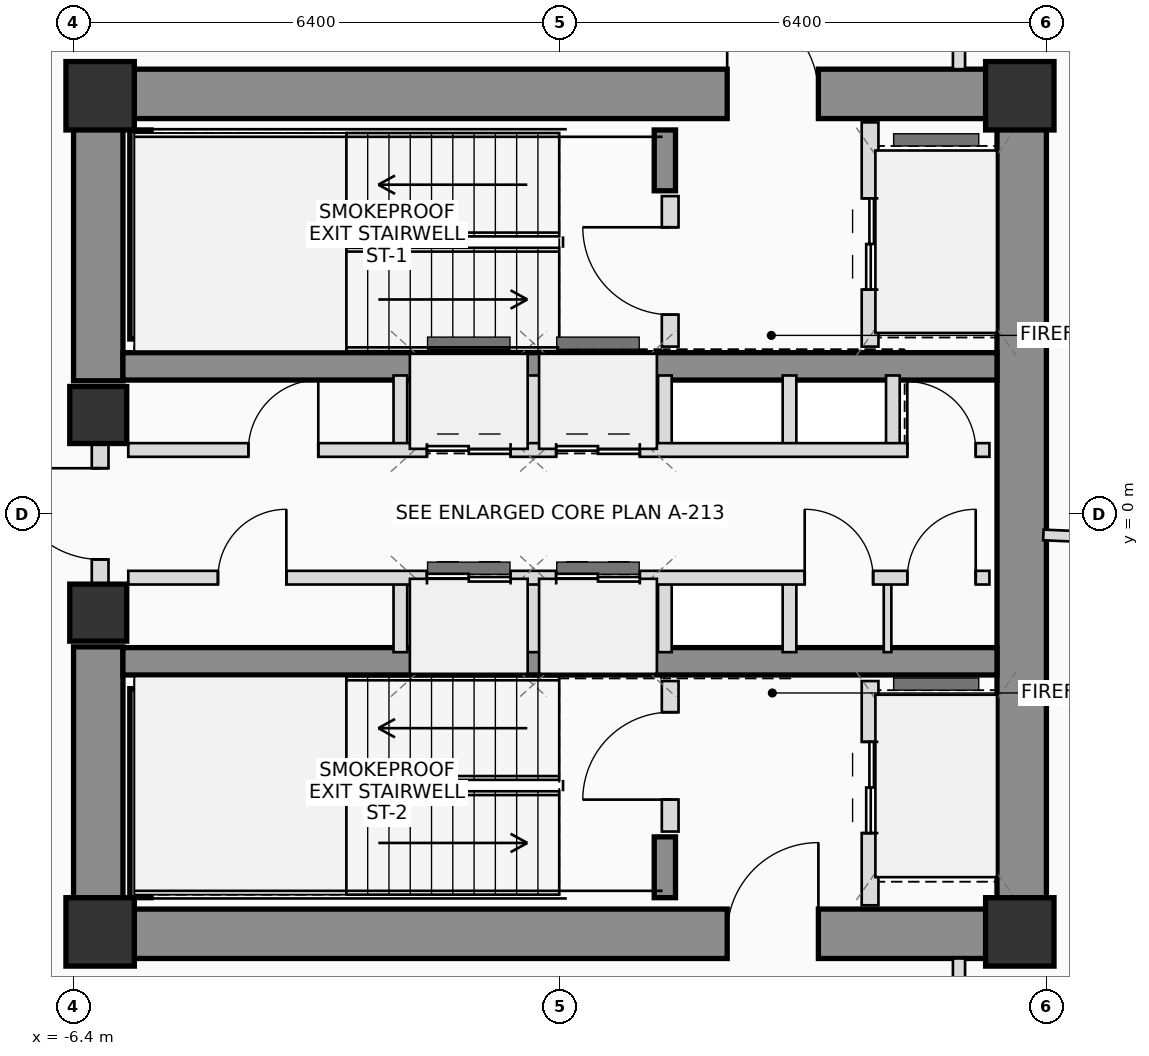
"""IFC4 building model, lengths in metres.
Left out: names, types, materials, properties, quantities, classifications, styles, units other than length and angle.
Written with IfcOpenShell. Run it as: python <this file> out.ifc"""

import sys

from ifc_helpers import new_model, si_unit, direction, frame, frame_2d, origin, origin_2d, place, context, subcontext, project, spatial, rectangle, extrude, source, transform, mapped, element, fill, save


model = new_model("IFC4")
c1 = context("Model", 3, precision=1e-05, world=origin(), true_north=direction((0.0, 1.0)))
c2 = subcontext(c1, "Body", "Model", "MODEL_VIEW")
j1 = project(units=[si_unit("LENGTHUNIT", "METRE"), si_unit("PLANEANGLEUNIT", "RADIAN")], contexts=[c1])
p1 = place(None, origin())
s1 = spatial("IfcSite", under=j1, at=p1, CompositionType="ELEMENT")
p2 = place(p1, origin())
s2 = spatial("IfcBuilding", under=s1, at=p2, CompositionType="ELEMENT")
p3 = place(p2, frame((0.0, 0.0, 136.4)))
s3 = spatial("IfcBuildingStorey", under=s2, at=p3, CompositionType="ELEMENT", Elevation=136.4)
m1 = source(origin(), c2, "Body", "SweptSolid", [
    extrude(rectangle(XDim=0.9, YDim=0.9, at=origin_2d()), origin(), (0.0, 0.0, 1.0), 3.45),
])
for number, where, z_axis, x_axis in (
    (1, (-6.05, -5.5, 0.0), (0.0, 0.0, 1.0), (1.0, 0.0, 0.0)),
    (2, (6.05, -5.5, 0.0), (0.0, 0.0, 1.0), (1.0, 0.0, 0.0)),
    (3, (6.05, 5.5, 0.0), (0.0, 0.0, 1.0), (1.0, 0.0, 0.0)),
    (4, (-6.05, 5.5, 0.0), (0.0, 0.0, 1.0), (1.0, 0.0, 0.0)),
):
    element("IfcColumn", number, at=place(p3, frame(where, z_axis=z_axis, x_axis=x_axis)), inside=s3, PredefinedType="COLUMN", context=c2, shape_type="MappedRepresentation", body=[
        mapped(m1, transform((0.0, 0.0, 0.0), scale=1.0)),
    ])
p4 = place(p3, frame((-6.4, 5.525, 0.0), z_axis=(0.0, 0.0, 1.0), x_axis=(1.0, 0.0, 0.0)))
e5 = element("IfcWall", 5, at=p4, inside=s3, PredefinedType="SHEAR", context=c2, shape_type="SweptSolid", body=[
    extrude(rectangle(XDim=12.8, YDim=0.65, at=frame_2d((6.4, 0.0))), origin(), (0.0, 0.0, 1.0), 3.45),
])
p5 = place(p4, frame((8.6, 0.0, 0.0)))
e6 = element("IfcOpeningElement", 6, at=p5, cuts=e5, PredefinedType="OPENING", context=c2, shape_type="SweptSolid", body=[
    extrude(rectangle(XDim=1.2, YDim=2.2, at=frame_2d((0.6, 1.1))), frame((0.0, 0.335, 0.0), z_axis=(0.0, -1.0, 0.0), x_axis=(1.0, 0.0, 0.0)), (0.0, 0.0, 1.0), 0.67),
])
p6 = place(p3, frame((-6.4, -5.525, 0.0), z_axis=(0.0, 0.0, 1.0), x_axis=(1.0, 0.0, 0.0)))
e7 = element("IfcWall", 7, at=p6, inside=s3, PredefinedType="SHEAR", context=c2, shape_type="SweptSolid", body=[
    extrude(rectangle(XDim=12.8, YDim=0.65, at=frame_2d((6.4, 0.0))), origin(), (0.0, 0.0, 1.0), 3.45),
])
p7 = place(p6, frame((8.6, 0.0, 0.0)))
e8 = element("IfcOpeningElement", 8, at=p7, cuts=e7, PredefinedType="OPENING", context=c2, shape_type="SweptSolid", body=[
    extrude(rectangle(XDim=1.2, YDim=2.2, at=frame_2d((0.6, 1.1))), frame((0.0, 0.335, 0.0), z_axis=(0.0, -1.0, 0.0), x_axis=(1.0, 0.0, 0.0)), (0.0, 0.0, 1.0), 0.67),
])
p8 = place(p3, frame((6.075, -5.2, 0.0), z_axis=(0.0, 0.0, 1.0), x_axis=(0.0, 1.0, 0.0)))
e9 = element("IfcWall", 9, at=p8, inside=s3, PredefinedType="SHEAR", context=c2, shape_type="SweptSolid", body=[
    extrude(rectangle(XDim=10.4, YDim=0.65, at=frame_2d((5.2, 0.0))), origin(), (0.0, 0.0, 1.0), 3.45),
])
for number, where, z_axis, x_axis in (
    (10, (-6.075, -5.2, 0.0), (0.0, 0.0, 1.0), (0.0, 1.0, 0.0)),
    (11, (-6.075, 1.75, 0.0), (0.0, 0.0, 1.0), (0.0, 1.0, 0.0)),
):
    element("IfcWall", number, at=place(p3, frame(where, z_axis=z_axis, x_axis=x_axis)), inside=s3, PredefinedType="SHEAR", context=c2, shape_type="SweptSolid", body=[
        extrude(rectangle(XDim=3.45, YDim=0.65, at=frame_2d((1.725, 0.0))), origin(), (0.0, 0.0, 1.0), 3.45),
    ])
for number, where, z_axis, x_axis in (
    (12, (-5.75, 1.94, 0.0), (0.0, 0.0, 1.0), (1.0, 0.0, 0.0)),
    (13, (-5.75, -1.94, 0.0), (0.0, 0.0, 1.0), (1.0, 0.0, 0.0)),
):
    element("IfcWall", number, at=place(p3, frame(where, z_axis=z_axis, x_axis=x_axis)), inside=s3, PredefinedType="SHEAR", context=c2, shape_type="SweptSolid", body=[
        extrude(rectangle(XDim=11.5, YDim=0.36, at=frame_2d((5.75, 0.0))), origin(), (0.0, 0.0, 1.0), 3.45),
    ])
p9 = place(p3, frame((-5.52, 2.3, 0.0), z_axis=(0.0, 0.0, 1.0), x_axis=(0.0, 1.0, 0.0)))
e14 = element("IfcWall", 14, at=p9, inside=s3, PredefinedType="SHEAR", context=c2, shape_type="SweptSolid", body=[
    extrude(rectangle(XDim=2.75, YDim=0.28, at=frame_2d((1.375, 0.0))), origin(), (0.0, 0.0, 1.0), 3.45),
])
p10 = place(p3, frame((1.38, 4.25, 0.0), z_axis=(0.0, 0.0, 1.0), x_axis=(0.0, 1.0, 0.0)))
e15 = element("IfcWall", 15, at=p10, inside=s3, PredefinedType="SHEAR", context=c2, shape_type="SweptSolid", body=[
    extrude(rectangle(XDim=0.8, YDim=0.28, at=frame_2d((0.4, 0.0))), origin(), (0.0, 0.0, 1.0), 3.45),
])
p11 = place(p3, frame((-5.52, -5.05, 0.0), z_axis=(0.0, 0.0, 1.0), x_axis=(0.0, 1.0, 0.0)))
e16 = element("IfcWall", 16, at=p11, inside=s3, PredefinedType="SHEAR", context=c2, shape_type="SweptSolid", body=[
    extrude(rectangle(XDim=2.75, YDim=0.28, at=frame_2d((1.375, 0.0))), origin(), (0.0, 0.0, 1.0), 3.45),
])
p12 = place(p3, frame((1.38, -5.05, 0.0), z_axis=(0.0, 0.0, 1.0), x_axis=(0.0, 1.0, 0.0)))
e17 = element("IfcWall", 17, at=p12, inside=s3, PredefinedType="SHEAR", context=c2, shape_type="SweptSolid", body=[
    extrude(rectangle(XDim=0.8, YDim=0.28, at=frame_2d((0.4, 0.0))), origin(), (0.0, 0.0, 1.0), 3.45),
])
m2 = source(origin(), c2, "Body", "SweptSolid", [
    extrude(rectangle(XDim=0.75, YDim=0.75, at=origin_2d()), origin(), (0.0, 0.0, 1.0), 3.45),
])
for number, where, z_axis, x_axis in (
    (18, (-6.075, -1.3, 0.0), (0.0, 0.0, 1.0), (1.0, 0.0, 0.0)),
    (19, (-6.075, 1.3, 0.0), (0.0, 0.0, 1.0), (1.0, 0.0, 0.0)),
):
    element("IfcColumn", number, at=place(p3, frame(where, z_axis=z_axis, x_axis=x_axis)), inside=s3, PredefinedType="COLUMN", context=c2, shape_type="MappedRepresentation", body=[
        mapped(m2, transform((0.0, 0.0, 0.0), scale=1.0)),
    ])
p13 = place(p3, frame((-6.05, -0.95, 0.0), z_axis=(0.0, 0.0, 1.0), x_axis=(0.0, 1.0, 0.0)))
e20 = element("IfcWall", 20, at=p13, inside=s3, PredefinedType="PLUMBINGWALL", context=c2, shape_type="SweptSolid", body=[
    extrude(rectangle(XDim=1.9, YDim=0.22, at=frame_2d((0.95, 0.0))), origin(), (0.0, 0.0, 1.0), 2.23),
])
p14 = place(p13, frame((0.35, 0.0, 0.0)))
e21 = element("IfcOpeningElement", 21, at=p14, cuts=e20, PredefinedType="OPENING", context=c2, shape_type="SweptSolid", body=[
    extrude(rectangle(XDim=1.2, YDim=2.2, at=frame_2d((0.6, 1.1))), frame((0.0, 0.12, 0.0), z_axis=(0.0, -1.0, 0.0), x_axis=(1.0, 0.0, 0.0)), (0.0, 0.0, 1.0), 0.24),
])
p15 = place(p3, frame((1.45, 2.2, 0.0), z_axis=(0.0, 0.0, 1.0), x_axis=(0.0, 1.0, 0.0)))
e22 = element("IfcWall", 22, at=p15, inside=s3, PredefinedType="PLUMBINGWALL", context=c2, shape_type="SweptSolid", body=[
    extrude(rectangle(XDim=1.98, YDim=0.22, at=frame_2d((0.99, 0.0))), origin(), (0.0, 0.0, 1.0), 3.25),
])
p16 = place(p15, frame((0.42, 0.0, 0.0)))
e23 = element("IfcOpeningElement", 23, at=p16, cuts=e22, PredefinedType="OPENING", context=c2, shape_type="SweptSolid", body=[
    extrude(rectangle(XDim=1.15, YDim=2.15, at=frame_2d((0.575, 1.075))), frame((0.0, 0.12, 0.0), z_axis=(0.0, -1.0, 0.0), x_axis=(1.0, 0.0, 0.0)), (0.0, 0.0, 1.0), 0.24),
])
p17 = place(p3, frame((4.08, 2.2, 0.0), z_axis=(0.0, 0.0, 1.0), x_axis=(0.0, 1.0, 0.0)))
e24 = element("IfcWall", 24, at=p17, inside=s3, PredefinedType="PLUMBINGWALL", context=c2, shape_type="SweptSolid", body=[
    extrude(rectangle(XDim=2.95, YDim=0.22, at=frame_2d((1.475, 0.0))), origin(), (0.0, 0.0, 1.0), 3.25),
])
p18 = place(p17, frame((0.75, 0.0, 0.0)))
e25 = element("IfcOpeningElement", 25, at=p18, cuts=e24, PredefinedType="OPENING", context=c2, shape_type="SweptSolid", body=[
    extrude(rectangle(XDim=1.2, YDim=2.25, at=frame_2d((0.6, 1.125))), frame((0.0, 0.12, 0.0), z_axis=(0.0, -1.0, 0.0), x_axis=(1.0, 0.0, 0.0)), (0.0, 0.0, 1.0), 0.24),
])
p19 = place(p3, frame((1.45, -4.18, 0.0), z_axis=(0.0, 0.0, 1.0), x_axis=(0.0, 1.0, 0.0)))
e26 = element("IfcWall", 26, at=p19, inside=s3, PredefinedType="PLUMBINGWALL", context=c2, shape_type="SweptSolid", body=[
    extrude(rectangle(XDim=1.98, YDim=0.22, at=frame_2d((0.99, 0.0))), origin(), (0.0, 0.0, 1.0), 3.25),
])
p20 = place(p19, frame((0.42, 0.0, 0.0)))
e27 = element("IfcOpeningElement", 27, at=p20, cuts=e26, PredefinedType="OPENING", context=c2, shape_type="SweptSolid", body=[
    extrude(rectangle(XDim=1.15, YDim=2.15, at=frame_2d((0.575, 1.075))), frame((0.0, 0.12, 0.0), z_axis=(0.0, -1.0, 0.0), x_axis=(1.0, 0.0, 0.0)), (0.0, 0.0, 1.0), 0.24),
])
p21 = place(p3, frame((4.08, -5.15, 0.0), z_axis=(0.0, 0.0, 1.0), x_axis=(0.0, 1.0, 0.0)))
e28 = element("IfcWall", 28, at=p21, inside=s3, PredefinedType="PLUMBINGWALL", context=c2, shape_type="SweptSolid", body=[
    extrude(rectangle(XDim=2.95, YDim=0.22, at=frame_2d((1.475, 0.0))), origin(), (0.0, 0.0, 1.0), 3.25),
])
p22 = place(p21, frame((0.95, 0.0, 0.0)))
e29 = element("IfcOpeningElement", 29, at=p22, cuts=e28, PredefinedType="OPENING", context=c2, shape_type="SweptSolid", body=[
    extrude(rectangle(XDim=1.2, YDim=2.25, at=frame_2d((0.6, 1.125))), frame((0.0, 0.12, 0.0), z_axis=(0.0, -1.0, 0.0), x_axis=(1.0, 0.0, 0.0)), (0.0, 0.0, 1.0), 0.24),
])
for number, where, z_axis, x_axis in (
    (30, (-2.1, 0.84, 0.0), (0.0, 0.0, 1.0), (0.0, 1.0, 0.0)),
    (31, (-2.1, -1.82, 0.0), (0.0, 0.0, 1.0), (0.0, 1.0, 0.0)),
    (32, (-0.35, 0.84, 0.0), (0.0, 0.0, 1.0), (0.0, 1.0, 0.0)),
    (33, (-0.35, -1.82, 0.0), (0.0, 0.0, 1.0), (0.0, 1.0, 0.0)),
    (34, (1.38, 0.84, 0.0), (0.0, 0.0, 1.0), (0.0, 1.0, 0.0)),
    (35, (1.38, -1.82, 0.0), (0.0, 0.0, 1.0), (0.0, 1.0, 0.0)),
    (36, (3.02, 0.84, 0.0), (0.0, 0.0, 1.0), (0.0, 1.0, 0.0)),
    (37, (4.38, 0.84, 0.0), (0.0, 0.0, 1.0), (0.0, 1.0, 0.0)),
    (38, (3.02, -1.82, 0.0), (0.0, 0.0, 1.0), (0.0, 1.0, 0.0)),
):
    element("IfcWall", number, at=place(p3, frame(where, z_axis=z_axis, x_axis=x_axis)), inside=s3, PredefinedType="PLUMBINGWALL", context=c2, shape_type="SweptSolid", body=[
        extrude(rectangle(XDim=0.98, YDim=0.18, at=frame_2d((0.49, 0.0))), origin(), (0.0, 0.0, 1.0), 3.25),
    ])
p23 = place(p3, frame((4.31, -1.82, 0.0), z_axis=(0.0, 0.0, 1.0), x_axis=(0.0, 1.0, 0.0)))
e39 = element("IfcWall", 39, at=p23, inside=s3, PredefinedType="PARTITIONING", context=c2, shape_type="SweptSolid", body=[
    extrude(rectangle(XDim=0.98, YDim=0.1, at=frame_2d((0.49, 0.0))), origin(), (0.0, 0.0, 1.0), 3.25),
])
p24 = place(p3, frame((-5.68, 0.84, 0.0), z_axis=(0.0, 0.0, 1.0), x_axis=(1.0, 0.0, 0.0)))
e40 = element("IfcWall", 40, at=p24, inside=s3, PredefinedType="PLUMBINGWALL", context=c2, shape_type="SweptSolid", body=[
    extrude(rectangle(XDim=11.33, YDim=0.18, at=frame_2d((5.665, 0.0))), origin(), (0.0, 0.0, 1.0), 3.25),
])
p25 = place(p24, frame((1.58, 0.0, 0.0)))
e41 = element("IfcOpeningElement", 41, at=p25, cuts=e40, PredefinedType="OPENING", context=c2, shape_type="SweptSolid", body=[
    extrude(rectangle(XDim=0.92, YDim=2.1, at=frame_2d((0.46, 1.05))), frame((0.0, 0.1, 0.0), z_axis=(0.0, -1.0, 0.0), x_axis=(1.0, 0.0, 0.0)), (0.0, 0.0, 1.0), 0.2),
])
p26 = place(p24, frame((3.93, 0.0, 0.0)))
e42 = element("IfcOpeningElement", 42, at=p26, cuts=e40, PredefinedType="OPENING", context=c2, shape_type="SweptSolid", body=[
    extrude(rectangle(XDim=1.1, YDim=2.2, at=frame_2d((0.55, 1.1))), frame((0.0, 0.1, 0.0), z_axis=(0.0, -1.0, 0.0), x_axis=(1.0, 0.0, 0.0)), (0.0, 0.0, 1.0), 0.2),
])
p27 = place(p24, frame((5.63, 0.0, 0.0)))
e43 = element("IfcOpeningElement", 43, at=p27, cuts=e40, PredefinedType="OPENING", context=c2, shape_type="SweptSolid", body=[
    extrude(rectangle(XDim=1.1, YDim=2.2, at=frame_2d((0.55, 1.1))), frame((0.0, 0.1, 0.0), z_axis=(0.0, -1.0, 0.0), x_axis=(1.0, 0.0, 0.0)), (0.0, 0.0, 1.0), 0.2),
])
p28 = place(p24, frame((10.25, 0.0, 0.0)))
e44 = element("IfcOpeningElement", 44, at=p28, cuts=e40, PredefinedType="OPENING", context=c2, shape_type="SweptSolid", body=[
    extrude(rectangle(XDim=0.9, YDim=2.05, at=frame_2d((0.45, 1.025))), frame((0.0, 0.1, 0.0), z_axis=(0.0, -1.0, 0.0), x_axis=(1.0, 0.0, 0.0)), (0.0, 0.0, 1.0), 0.2),
])
p29 = place(p3, frame((-5.68, -0.84, 0.0), z_axis=(0.0, 0.0, 1.0), x_axis=(1.0, 0.0, 0.0)))
e45 = element("IfcWall", 45, at=p29, inside=s3, PredefinedType="PLUMBINGWALL", context=c2, shape_type="SweptSolid", body=[
    extrude(rectangle(XDim=11.33, YDim=0.18, at=frame_2d((5.665, 0.0))), origin(), (0.0, 0.0, 1.0), 3.25),
])
p30 = place(p29, frame((1.18, 0.0, 0.0)))
e46 = element("IfcOpeningElement", 46, at=p30, cuts=e45, PredefinedType="OPENING", context=c2, shape_type="SweptSolid", body=[
    extrude(rectangle(XDim=0.9, YDim=2.05, at=frame_2d((0.45, 1.025))), frame((0.0, 0.1, 0.0), z_axis=(0.0, -1.0, 0.0), x_axis=(1.0, 0.0, 0.0)), (0.0, 0.0, 1.0), 0.2),
])
p31 = place(p29, frame((3.93, 0.0, 0.0)))
e47 = element("IfcOpeningElement", 47, at=p31, cuts=e45, PredefinedType="OPENING", context=c2, shape_type="SweptSolid", body=[
    extrude(rectangle(XDim=1.1, YDim=2.2, at=frame_2d((0.55, 1.1))), frame((0.0, 0.1, 0.0), z_axis=(0.0, -1.0, 0.0), x_axis=(1.0, 0.0, 0.0)), (0.0, 0.0, 1.0), 0.2),
])
p32 = place(p29, frame((5.63, 0.0, 0.0)))
e48 = element("IfcOpeningElement", 48, at=p32, cuts=e45, PredefinedType="OPENING", context=c2, shape_type="SweptSolid", body=[
    extrude(rectangle(XDim=1.1, YDim=2.2, at=frame_2d((0.55, 1.1))), frame((0.0, 0.1, 0.0), z_axis=(0.0, -1.0, 0.0), x_axis=(1.0, 0.0, 0.0)), (0.0, 0.0, 1.0), 0.2),
])
p33 = place(p29, frame((8.9, 0.0, 0.0)))
e49 = element("IfcOpeningElement", 49, at=p33, cuts=e45, PredefinedType="OPENING", context=c2, shape_type="SweptSolid", body=[
    extrude(rectangle(XDim=0.9, YDim=2.05, at=frame_2d((0.45, 1.025))), frame((0.0, 0.1, 0.0), z_axis=(0.0, -1.0, 0.0), x_axis=(1.0, 0.0, 0.0)), (0.0, 0.0, 1.0), 0.2),
])
p34 = place(p29, frame((10.25, 0.0, 0.0)))
e50 = element("IfcOpeningElement", 50, at=p34, cuts=e45, PredefinedType="OPENING", context=c2, shape_type="SweptSolid", body=[
    extrude(rectangle(XDim=0.9, YDim=2.05, at=frame_2d((0.45, 1.025))), frame((0.0, 0.1, 0.0), z_axis=(0.0, -1.0, 0.0), x_axis=(1.0, 0.0, 0.0)), (0.0, 0.0, 1.0), 0.2),
])
p35 = place(p3, frame((5.25, 7.55, 0.0), z_axis=(0.0, 0.0, 1.0), x_axis=(0.0, -1.0, 0.0)))
e51 = element("IfcWall", 51, at=p35, inside=s3, PredefinedType="PARTITIONING", context=c2, shape_type="SweptSolid", body=[
    extrude(rectangle(XDim=1.7, YDim=0.16, at=frame_2d((0.85, 0.0))), origin(), (0.0, 0.0, 1.0), 2.605),
])
p36 = place(p3, frame((5.25, -5.85, 0.0), z_axis=(0.0, 0.0, 1.0), x_axis=(0.0, -1.0, 0.0)))
e52 = element("IfcWall", 52, at=p36, inside=s3, PredefinedType="PARTITIONING", context=c2, shape_type="SweptSolid", body=[
    extrude(rectangle(XDim=1.7, YDim=0.16, at=frame_2d((0.85, 0.0))), origin(), (0.0, 0.0, 1.0), 3.25),
])
p37 = place(p3, frame((6.36, -0.278, 0.0), z_axis=(0.0, 0.0, 1.0), x_axis=(0.999047707238, -0.043631166178, 0.0)))
e53 = element("IfcWall", 53, at=p37, inside=s3, PredefinedType="PARTITIONING", context=c2, shape_type="SweptSolid", body=[
    extrude(rectangle(XDim=8.522, YDim=0.14, at=frame_2d((4.261, 0.0))), origin(), (0.0, 0.0, 1.0), 2.605),
])
p38 = place(p5, origin())
e54 = element("IfcDoor", 54, at=p38, inside=s3, OperationType="SINGLE_SWING_LEFT", PredefinedType="DOOR", context=c2, shape_type="SweptSolid", body=[
    extrude(rectangle(XDim=1.2, YDim=2.2, at=frame_2d((0.6, 1.1))), frame((0.0, 0.025, 0.0), z_axis=(0.0, -1.0, 0.0), x_axis=(1.0, 0.0, 0.0)), (0.0, 0.0, 1.0), 0.05),
])
fill(e6, e54)
p39 = place(p7, origin())
e55 = element("IfcDoor", 55, at=p39, inside=s3, OperationType="SINGLE_SWING_RIGHT", PredefinedType="DOOR", context=c2, shape_type="SweptSolid", body=[
    extrude(rectangle(XDim=1.2, YDim=2.2, at=frame_2d((0.6, 1.1))), frame((0.0, 0.025, 0.0), z_axis=(0.0, -1.0, 0.0), x_axis=(1.0, 0.0, 0.0)), (0.0, 0.0, 1.0), 0.05),
])
fill(e8, e55)
p40 = place(p14, origin())
e56 = element("IfcDoor", 56, at=p40, inside=s3, OperationType="SINGLE_SWING_RIGHT", PredefinedType="DOOR", context=c2, shape_type="SweptSolid", body=[
    extrude(rectangle(XDim=1.2, YDim=2.2, at=frame_2d((0.6, 1.1))), frame((0.0, 0.025, 0.0), z_axis=(0.0, -1.0, 0.0), x_axis=(1.0, 0.0, 0.0)), (0.0, 0.0, 1.0), 0.05),
])
fill(e21, e56)
p41 = place(p16, origin())
e57 = element("IfcDoor", 57, at=p41, inside=s3, OperationType="SINGLE_SWING_RIGHT", PredefinedType="DOOR", context=c2, shape_type="SweptSolid", body=[
    extrude(rectangle(XDim=1.15, YDim=2.15, at=frame_2d((0.575, 1.075))), frame((0.0, 0.025, 0.0), z_axis=(0.0, -1.0, 0.0), x_axis=(1.0, 0.0, 0.0)), (0.0, 0.0, 1.0), 0.05),
])
fill(e23, e57)
p42 = place(p18, origin())
e58 = element("IfcDoor", 58, at=p42, inside=s3, OperationType="DOUBLE_DOOR_SLIDING", PredefinedType="DOOR", context=c2, shape_type="SweptSolid", body=[
    extrude(rectangle(XDim=1.2, YDim=2.25, at=frame_2d((0.6, 1.125))), frame((0.0, 0.025, 0.0), z_axis=(0.0, -1.0, 0.0), x_axis=(1.0, 0.0, 0.0)), (0.0, 0.0, 1.0), 0.05),
])
fill(e25, e58)
p43 = place(p20, origin())
e59 = element("IfcDoor", 59, at=p43, inside=s3, OperationType="SINGLE_SWING_LEFT", PredefinedType="DOOR", context=c2, shape_type="SweptSolid", body=[
    extrude(rectangle(XDim=1.15, YDim=2.15, at=frame_2d((0.575, 1.075))), frame((0.0, 0.025, 0.0), z_axis=(0.0, -1.0, 0.0), x_axis=(1.0, 0.0, 0.0)), (0.0, 0.0, 1.0), 0.05),
])
fill(e27, e59)
p44 = place(p22, origin())
e60 = element("IfcDoor", 60, at=p44, inside=s3, OperationType="DOUBLE_DOOR_SLIDING", PredefinedType="DOOR", context=c2, shape_type="SweptSolid", body=[
    extrude(rectangle(XDim=1.2, YDim=2.25, at=frame_2d((0.6, 1.125))), frame((0.0, 0.025, 0.0), z_axis=(0.0, -1.0, 0.0), x_axis=(1.0, 0.0, 0.0)), (0.0, 0.0, 1.0), 0.05),
])
fill(e29, e60)
p45 = place(p25, origin())
e61 = element("IfcDoor", 61, at=p45, inside=s3, OperationType="SINGLE_SWING_RIGHT", PredefinedType="DOOR", context=c2, shape_type="SweptSolid", body=[
    extrude(rectangle(XDim=0.92, YDim=2.1, at=frame_2d((0.46, 1.05))), frame((0.0, 0.025, 0.0), z_axis=(0.0, -1.0, 0.0), x_axis=(1.0, 0.0, 0.0)), (0.0, 0.0, 1.0), 0.05),
])
fill(e41, e61)
p46 = place(p26, origin())
e62 = element("IfcDoor", 62, at=p46, inside=s3, OperationType="DOUBLE_DOOR_SLIDING", PredefinedType="DOOR", context=c2, shape_type="SweptSolid", body=[
    extrude(rectangle(XDim=1.1, YDim=2.2, at=frame_2d((0.55, 1.1))), frame((0.0, 0.025, 0.0), z_axis=(0.0, -1.0, 0.0), x_axis=(1.0, 0.0, 0.0)), (0.0, 0.0, 1.0), 0.05),
])
fill(e42, e62)
p47 = place(p27, origin())
e63 = element("IfcDoor", 63, at=p47, inside=s3, OperationType="DOUBLE_DOOR_SLIDING", PredefinedType="DOOR", context=c2, shape_type="SweptSolid", body=[
    extrude(rectangle(XDim=1.1, YDim=2.2, at=frame_2d((0.55, 1.1))), frame((0.0, 0.025, 0.0), z_axis=(0.0, -1.0, 0.0), x_axis=(1.0, 0.0, 0.0)), (0.0, 0.0, 1.0), 0.05),
])
fill(e43, e63)
p48 = place(p28, origin())
e64 = element("IfcDoor", 64, at=p48, inside=s3, OperationType="SINGLE_SWING_LEFT", PredefinedType="DOOR", context=c2, shape_type="SweptSolid", body=[
    extrude(rectangle(XDim=0.9, YDim=2.05, at=frame_2d((0.45, 1.025))), frame((0.0, 0.025, 0.0), z_axis=(0.0, -1.0, 0.0), x_axis=(1.0, 0.0, 0.0)), (0.0, 0.0, 1.0), 0.05),
])
fill(e44, e64)
p49 = place(p30, origin())
e65 = element("IfcDoor", 65, at=p49, inside=s3, OperationType="SINGLE_SWING_RIGHT", PredefinedType="DOOR", context=c2, shape_type="SweptSolid", body=[
    extrude(rectangle(XDim=0.9, YDim=2.05, at=frame_2d((0.45, 1.025))), frame((0.0, 0.025, 0.0), z_axis=(0.0, -1.0, 0.0), x_axis=(1.0, 0.0, 0.0)), (0.0, 0.0, 1.0), 0.05),
])
fill(e46, e65)
p50 = place(p31, origin())
e66 = element("IfcDoor", 66, at=p50, inside=s3, OperationType="DOUBLE_DOOR_SLIDING", PredefinedType="DOOR", context=c2, shape_type="SweptSolid", body=[
    extrude(rectangle(XDim=1.1, YDim=2.2, at=frame_2d((0.55, 1.1))), frame((0.0, 0.025, 0.0), z_axis=(0.0, -1.0, 0.0), x_axis=(1.0, 0.0, 0.0)), (0.0, 0.0, 1.0), 0.05),
])
fill(e47, e66)
p51 = place(p32, origin())
e67 = element("IfcDoor", 67, at=p51, inside=s3, OperationType="DOUBLE_DOOR_SLIDING", PredefinedType="DOOR", context=c2, shape_type="SweptSolid", body=[
    extrude(rectangle(XDim=1.1, YDim=2.2, at=frame_2d((0.55, 1.1))), frame((0.0, 0.025, 0.0), z_axis=(0.0, -1.0, 0.0), x_axis=(1.0, 0.0, 0.0)), (0.0, 0.0, 1.0), 0.05),
])
fill(e48, e67)
p52 = place(p33, origin())
e68 = element("IfcDoor", 68, at=p52, inside=s3, OperationType="SINGLE_SWING_LEFT", PredefinedType="DOOR", context=c2, shape_type="SweptSolid", body=[
    extrude(rectangle(XDim=0.9, YDim=2.05, at=frame_2d((0.45, 1.025))), frame((0.0, 0.025, 0.0), z_axis=(0.0, -1.0, 0.0), x_axis=(1.0, 0.0, 0.0)), (0.0, 0.0, 1.0), 0.05),
])
fill(e49, e68)
p53 = place(p34, origin())
e69 = element("IfcDoor", 69, at=p53, inside=s3, OperationType="SINGLE_SWING_RIGHT", PredefinedType="DOOR", context=c2, shape_type="SweptSolid", body=[
    extrude(rectangle(XDim=0.9, YDim=2.05, at=frame_2d((0.45, 1.025))), frame((0.0, 0.025, 0.0), z_axis=(0.0, -1.0, 0.0), x_axis=(1.0, 0.0, 0.0)), (0.0, 0.0, 1.0), 0.05),
])
fill(e50, e69)
save(model, sys.argv[1])
